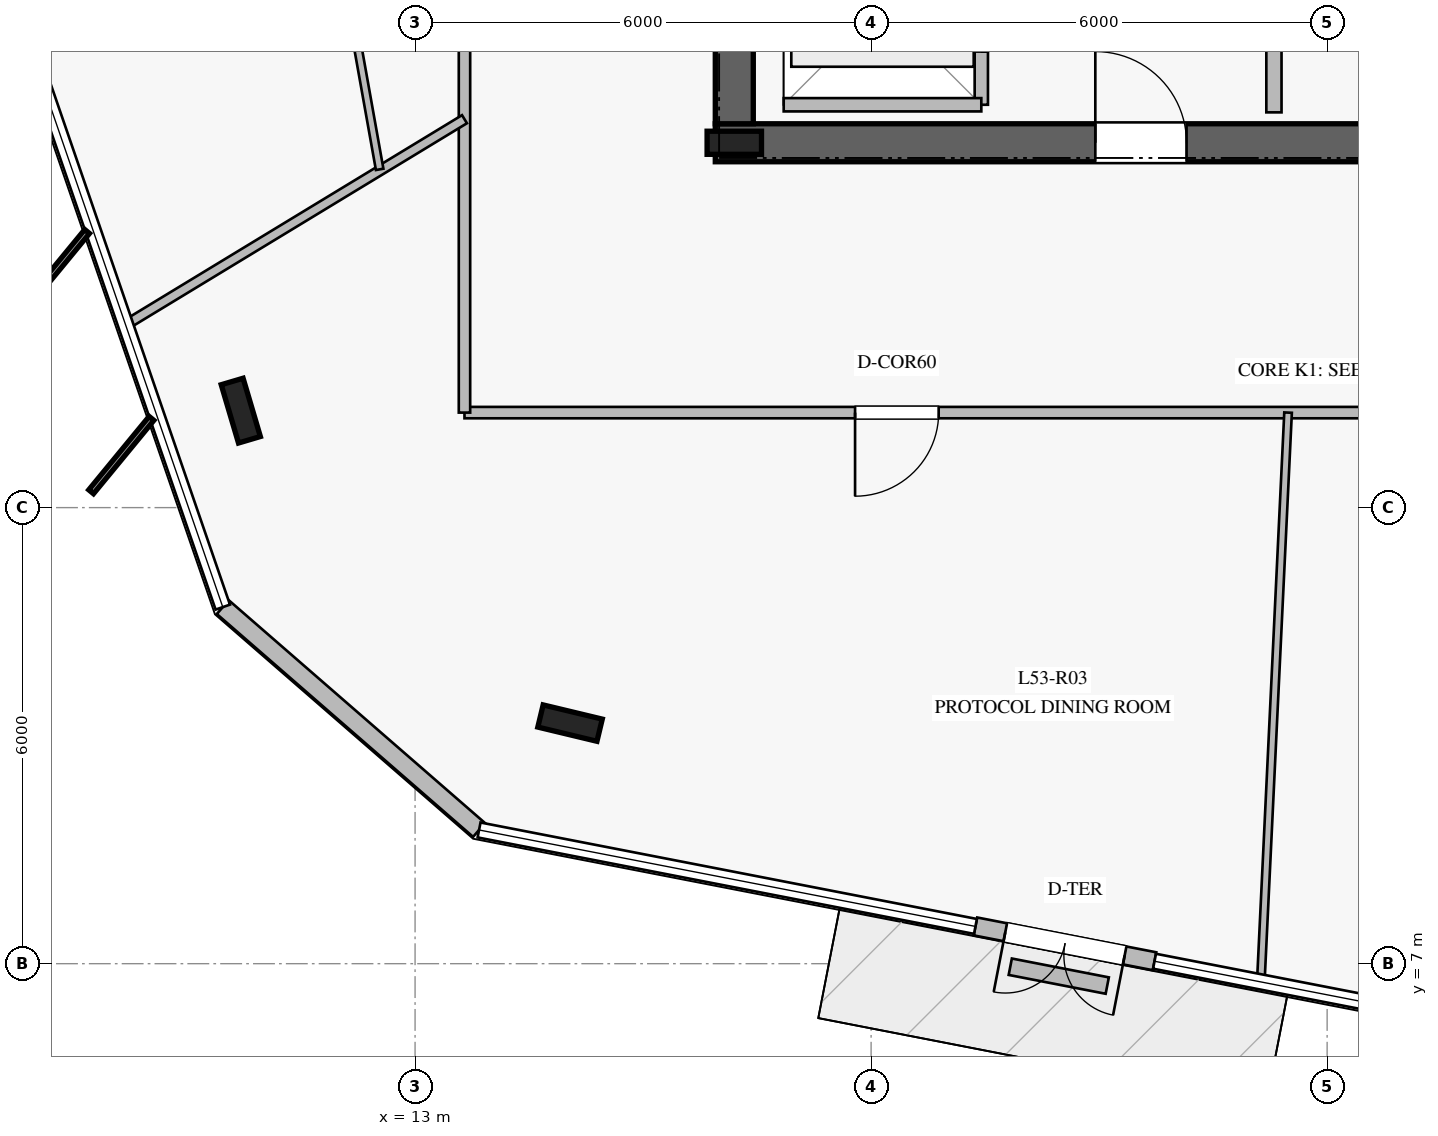
"""IFC4 building model, lengths in metres.
Left out: names, types, materials, properties, quantities, classifications, styles, units other than length and angle.
Written with IfcOpenShell. Run it as: python <this file> out.ifc"""

import sys

from ifc_helpers import new_model, si_unit, direction, frame, frame_2d, origin, origin_2d, place, context, subcontext, project, spatial, rectangle, i_section, extrude, element, fill, save


model = new_model("IFC4")
c1 = context("Model", 3, precision=1e-05, world=origin(), true_north=direction((0.0, 1.0)))
c2 = subcontext(c1, "Body", "Model", "MODEL_VIEW")
j1 = project(units=[si_unit("LENGTHUNIT", "METRE"), si_unit("PLANEANGLEUNIT", "RADIAN")], contexts=[c1])
p1 = place(None, origin())
s1 = spatial("IfcSite", under=j1, at=p1, CompositionType="ELEMENT")
p2 = place(p1, origin())
s2 = spatial("IfcBuilding", under=s1, at=p2, CompositionType="ELEMENT")
p3 = place(p2, frame((0.0, 0.0, 220.8)))
s3 = spatial("IfcBuildingStorey", under=s2, at=p3, CompositionType="ELEMENT", Elevation=220.8)
p4 = place(p3, frame((16.95, 17.8, 0.0), z_axis=(0.0, 0.0, 1.0), x_axis=(1.0, 0.0, 0.0)))
e1 = element("IfcWall", 1, at=p4, inside=s3, PredefinedType="SHEAR", context=c2, shape_type="SweptSolid", body=[
    extrude(rectangle(XDim=16.1, YDim=0.5, at=frame_2d((8.05, 0.0))), origin(), (0.0, 0.0, 1.0), 3.78),
])
p5 = place(p4, frame((5.0, 0.0, 0.0)))
e2 = element("IfcOpeningElement", 2, at=p5, cuts=e1, PredefinedType="OPENING", context=c2, shape_type="SweptSolid", body=[
    extrude(rectangle(XDim=1.2, YDim=2.25, at=frame_2d((0.6, 1.125))), frame((0.0, 0.26, 0.0), z_axis=(0.0, -1.0, 0.0), x_axis=(1.0, 0.0, 0.0)), (0.0, 0.0, 1.0), 0.52),
])
p6 = place(p4, frame((10.9, 0.0, 0.0)))
e3 = element("IfcOpeningElement", 3, at=p6, cuts=e1, PredefinedType="OPENING", context=c2, shape_type="SweptSolid", body=[
    extrude(rectangle(XDim=1.1, YDim=2.2, at=frame_2d((0.55, 1.1))), frame((0.0, 0.26, 0.0), z_axis=(0.0, -1.0, 0.0), x_axis=(1.0, 0.0, 0.0)), (0.0, 0.0, 1.0), 0.52),
])
p7 = place(p3, frame((17.2, 31.95, 0.0), z_axis=(0.0, 0.0, 1.0), x_axis=(0.0, -1.0, 0.0)))
e4 = element("IfcWall", 4, at=p7, inside=s3, PredefinedType="SHEAR", context=c2, shape_type="SweptSolid", body=[
    extrude(rectangle(XDim=13.9, YDim=0.5, at=frame_2d((6.95, 0.0))), origin(), (0.0, 0.0, 1.0), 3.78),
])
p8 = place(p7, frame((2.1, 0.0, 0.0)))
e5 = element("IfcOpeningElement", 5, at=p8, cuts=e4, PredefinedType="OPENING", context=c2, shape_type="SweptSolid", body=[
    extrude(rectangle(XDim=1.5, YDim=2.2, at=frame_2d((0.75, 1.1))), frame((0.0, 0.26, 0.0), z_axis=(0.0, -1.0, 0.0), x_axis=(1.0, 0.0, 0.0)), (0.0, 0.0, 1.0), 0.52),
])
p9 = place(p3, frame((17.2, 17.8, 0.0), z_axis=(0.0, 0.0, 1.0), x_axis=(1.0, 0.0, 0.0)))
e6 = element("IfcColumn", 6, at=p9, inside=s3, PredefinedType="COLUMN", context=c2, shape_type="SweptSolid", body=[
    extrude(i_section(OverallWidth=0.304, OverallDepth=0.716, WebThickness=0.021, FlangeThickness=0.04, at=origin_2d()), origin(), (0.0, 0.0, 1.0), 4.0),
])
for number, where, z_axis, x_axis in (
    (7, (10.707, 14.276, 0.0), (0.0, 0.0, 1.0), (-0.284, 0.959, 0.0)),
    (8, (15.039, 10.165, 0.0), (0.0, 0.0, 1.0), (-0.972, 0.233, 0.0)),
):
    element("IfcColumn", number, at=place(p3, frame(where, z_axis=z_axis, x_axis=x_axis)), inside=s3, PredefinedType="COLUMN", context=c2, shape_type="SweptSolid", body=[
        extrude(i_section(OverallWidth=0.3, OverallDepth=0.8, WebThickness=0.018, FlangeThickness=0.033, at=origin_2d()), origin(), (0.0, 0.0, 1.0), 4.0),
    ])
p10 = place(p3, frame((10.47, 11.691, 0.0), z_axis=(0.0, 0.0, 1.0), x_axis=(0.754644337128, -0.656134075049, 0.0)))
e9 = element("IfcWall", 9, at=p10, inside=s3, PredefinedType="STANDARD", context=c2, shape_type="SweptSolid", body=[
    extrude(rectangle(XDim=4.469, YDim=0.24, at=frame_2d((2.234, 0.0))), origin(), (0.0, 0.0, 1.0), 3.78),
])
p11 = place(p3, frame((20.373, 7.49, 0.0), z_axis=(0.0, 0.0, 1.0), x_axis=(0.981622800685, -0.190831541356, 0.0)))
e10 = element("IfcWall", 10, at=p11, inside=s3, PredefinedType="STANDARD", context=c2, shape_type="SweptSolid", body=[
    extrude(rectangle(XDim=2.4, YDim=0.24, at=frame_2d((1.2, 0.0))), origin(), (0.0, 0.0, 1.0), 3.78),
])
p12 = place(p11, frame((0.4, 0.0, 0.0)))
e11 = element("IfcOpeningElement", 11, at=p12, cuts=e10, PredefinedType="OPENING", context=c2, shape_type="SweptSolid", body=[
    extrude(rectangle(XDim=1.6, YDim=2.25, at=frame_2d((0.8, 1.125))), frame((0.0, 0.13, 0.0), z_axis=(0.0, -1.0, 0.0), x_axis=(1.0, 0.0, 0.0)), (0.0, 0.0, 1.0), 0.26),
])
p13 = place(p3, frame((20.831, 6.96, 0.0), z_axis=(0.0, 0.0, 1.0), x_axis=(0.981621254658, -0.190839493826, 0.0)))
e12 = element("IfcWall", 12, at=p13, inside=s3, PredefinedType="USERDEFINED", context=c2, shape_type="SweptSolid", body=[
    extrude(rectangle(XDim=1.3, YDim=0.22, at=frame_2d((0.65, 0.0))), origin(), (0.0, 0.0, 1.0), 0.4),
])
p14 = place(p3, frame((24.3, 18.2, 0.0), z_axis=(0.0, 0.0, 1.0), x_axis=(0.0, 1.0, 0.0)))
e13 = element("IfcWall", 13, at=p14, inside=s3, PredefinedType="PARTITIONING", context=c2, shape_type="SweptSolid", body=[
    extrude(rectangle(XDim=5.15, YDim=0.2, at=frame_2d((2.575, 0.0))), origin(), (0.0, 0.0, 1.0), 3.78),
])
p15 = place(p3, frame((20.45, 18.3, 0.0), z_axis=(0.0, 0.0, 1.0), x_axis=(0.0, 1.0, 0.0)))
e14 = element("IfcWall", 14, at=p15, inside=s3, PredefinedType="PARTITIONING", context=c2, shape_type="SweptSolid", body=[
    extrude(rectangle(XDim=2.6, YDim=0.175, at=frame_2d((1.3, 0.0))), origin(), (0.0, 0.0, 1.0), 3.78),
])
p16 = place(p15, frame((0.7, 0.0, 0.0)))
e15 = element("IfcOpeningElement", 15, at=p16, cuts=e14, PredefinedType="OPENING", context=c2, shape_type="SweptSolid", body=[
    extrude(rectangle(XDim=1.2, YDim=2.2, at=frame_2d((0.6, 1.1))), frame((0.0, 0.098, 0.0), z_axis=(0.0, -1.0, 0.0), x_axis=(1.0, 0.0, 0.0)), (0.0, 0.0, 1.0), 0.195),
])
p17 = place(p3, frame((17.85, 18.3, 0.0), z_axis=(0.0, 0.0, 1.0), x_axis=(1.0, 0.0, 0.0)))
e16 = element("IfcWall", 16, at=p17, inside=s3, PredefinedType="PARTITIONING", context=c2, shape_type="SweptSolid", body=[
    extrude(rectangle(XDim=2.6, YDim=0.175, at=frame_2d((1.3, 0.0))), origin(), (0.0, 0.0, 1.0), 3.78),
])
p18 = place(p3, frame((36.35, 14.25, 0.0), z_axis=(0.0, 0.0, 1.0), x_axis=(-1.0, 0.0, 0.0)))
e17 = element("IfcWall", 17, at=p18, inside=s3, PredefinedType="PARTITIONING", context=c2, shape_type="SweptSolid", body=[
    extrude(rectangle(XDim=22.7, YDim=0.15, at=frame_2d((11.35, 0.0))), origin(), (0.0, 0.0, 1.0), 3.28),
])
p19 = place(p18, frame((16.461, 0.0, 0.0)))
e18 = element("IfcOpeningElement", 18, at=p19, cuts=e17, PredefinedType="OPENING", context=c2, shape_type="SweptSolid", body=[
    extrude(rectangle(XDim=1.1, YDim=2.2, at=frame_2d((0.55, 1.1))), frame((0.0, 0.085, 0.0), z_axis=(0.0, -1.0, 0.0), x_axis=(1.0, 0.0, 0.0)), (0.0, 0.0, 1.0), 0.17),
])
p20 = place(p3, frame((13.65, 14.25, 0.0), z_axis=(0.0, 0.0, 1.0), x_axis=(0.0, 1.0, 0.0)))
e19 = element("IfcWall", 19, at=p20, inside=s3, PredefinedType="PARTITIONING", context=c2, shape_type="SweptSolid", body=[
    extrude(rectangle(XDim=21.5, YDim=0.15, at=frame_2d((10.75, 0.0))), origin(), (0.0, 0.0, 1.0), 3.05),
])
p21 = place(p20, frame((8.443, 0.0, 0.0)))
e20 = element("IfcOpeningElement", 20, at=p21, cuts=e19, PredefinedType="OPENING", context=c2, shape_type="SweptSolid", body=[
    extrude(rectangle(XDim=1.1, YDim=2.2, at=frame_2d((0.55, 1.1))), frame((0.0, 0.085, 0.0), z_axis=(0.0, -1.0, 0.0), x_axis=(1.0, 0.0, 0.0)), (0.0, 0.0, 1.0), 0.17),
])
p22 = place(p3, frame((13.65, 18.11, 0.0), z_axis=(0.0, 0.0, 1.0), x_axis=(-0.854791979371, -0.518970781454, 0.0)))
e21 = element("IfcWall", 21, at=p22, inside=s3, PredefinedType="PARTITIONING", context=c2, shape_type="SweptSolid", body=[
    extrude(rectangle(XDim=5.199, YDim=0.125, at=frame_2d((2.599, 0.0))), origin(), (0.0, 0.0, 1.0), 3.18),
])
p23 = place(p3, frame((24.486, 14.25, 0.0), z_axis=(0.0, 0.0, 1.0), x_axis=(-0.047872130545, -0.998853472296, 0.0)))
e22 = element("IfcWall", 22, at=p23, inside=s3, PredefinedType="MOVABLE", context=c2, shape_type="SweptSolid", body=[
    extrude(rectangle(XDim=7.481, YDim=0.1, at=frame_2d((3.741, 0.0))), origin(), (0.0, 0.0, 1.0), 3.18),
])
p24 = place(p3, frame((10.362, 29.603, 0.0), z_axis=(0.0, 0.0, 1.0), x_axis=(0.175922734222, -0.984403977838, 0.0)))
e23 = element("IfcWall", 23, at=p24, inside=s3, PredefinedType="MOVABLE", context=c2, shape_type="SweptSolid", body=[
    extrude(rectangle(XDim=12.346, YDim=0.1, at=frame_2d((6.173, 0.0))), origin(), (0.0, 0.0, 1.0), 3.25),
])
p25 = place(p24, frame((5.673, 0.0, 0.0)))
e24 = element("IfcOpeningElement", 24, at=p25, cuts=e23, PredefinedType="OPENING", context=c2, shape_type="SweptSolid", body=[
    extrude(rectangle(XDim=1.0, YDim=2.15, at=frame_2d((0.5, 1.075))), frame((0.0, 0.06, 0.0), z_axis=(0.0, -1.0, 0.0), x_axis=(1.0, 0.0, 0.0)), (0.0, 0.0, 1.0), 0.12),
])
p26 = place(p12, frame((1.6, 0.0, 0.0), z_axis=(0.0, 0.0, 1.0), x_axis=(-1.0, 0.0, 0.0)))
e25 = element("IfcDoor", 25, at=p26, inside=s3, OperationType="DOUBLE_DOOR_SINGLE_SWING", PredefinedType="DOOR", context=c2, shape_type="SweptSolid", body=[
    extrude(rectangle(XDim=1.6, YDim=2.25, at=frame_2d((0.8, 1.125))), frame((0.0, 0.025, 0.0), z_axis=(0.0, -1.0, 0.0), x_axis=(1.0, 0.0, 0.0)), (0.0, 0.0, 1.0), 0.05),
])
fill(e11, e25)
p27 = place(p5, origin())
e26 = element("IfcDoor", 26, at=p27, inside=s3, OperationType="SINGLE_SWING_LEFT", PredefinedType="DOOR", context=c2, shape_type="SweptSolid", body=[
    extrude(rectangle(XDim=1.2, YDim=2.25, at=frame_2d((0.6, 1.125))), frame((0.0, 0.025, 0.0), z_axis=(0.0, -1.0, 0.0), x_axis=(1.0, 0.0, 0.0)), (0.0, 0.0, 1.0), 0.05),
])
fill(e2, e26)
p28 = place(p19, origin())
e27 = element("IfcDoor", 27, at=p28, inside=s3, OperationType="SINGLE_SWING_RIGHT", PredefinedType="DOOR", context=c2, shape_type="SweptSolid", body=[
    extrude(rectangle(XDim=1.1, YDim=2.2, at=frame_2d((0.55, 1.1))), frame((0.0, 0.025, 0.0), z_axis=(0.0, -1.0, 0.0), x_axis=(1.0, 0.0, 0.0)), (0.0, 0.0, 1.0), 0.05),
])
fill(e18, e27)
save(model, sys.argv[1])
